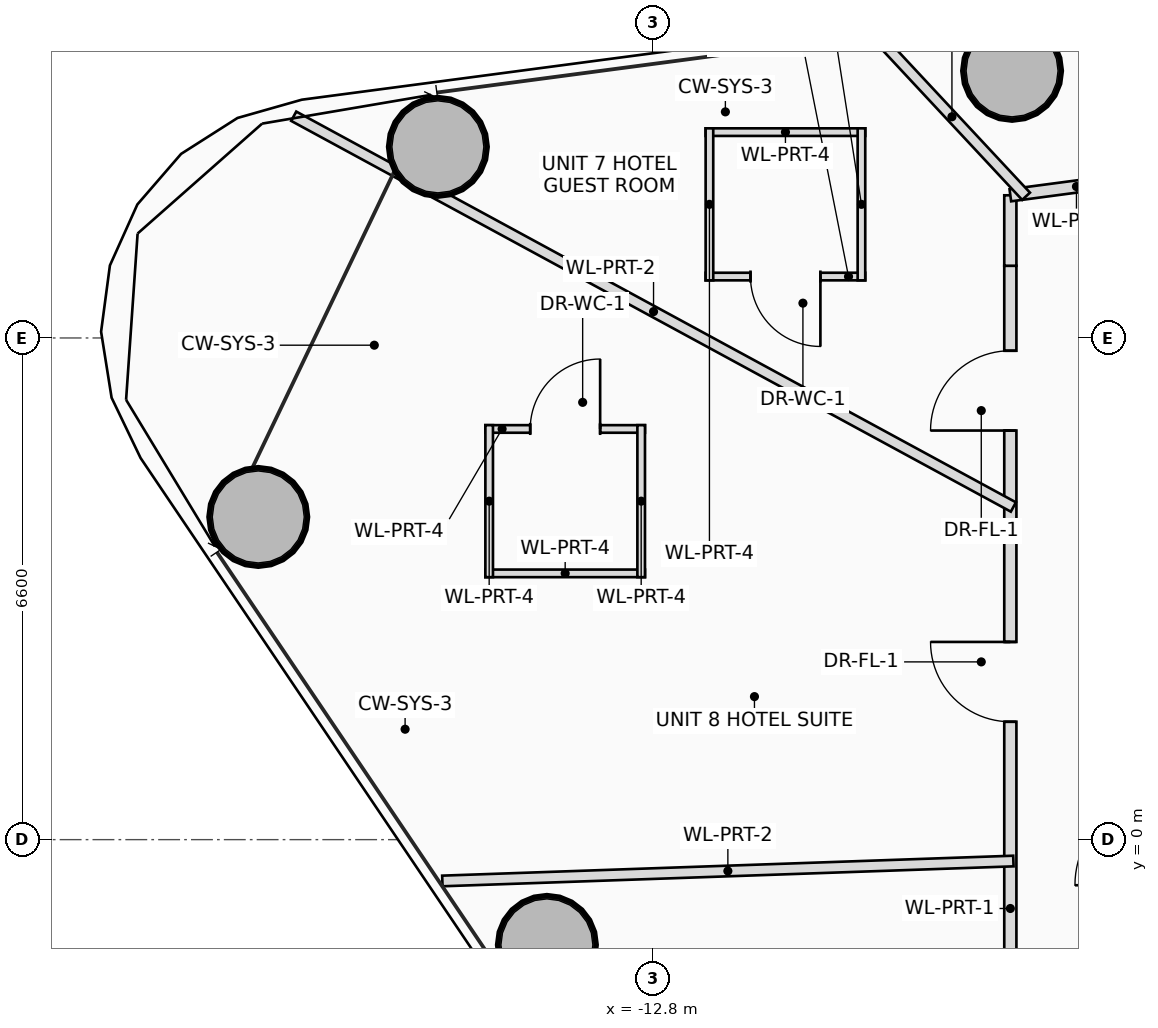
"""IFC4 building model, lengths in metres.
Left out: names, types, materials, properties, quantities, classifications, styles, units other than length and angle.
Written with IfcOpenShell. Run it as: python <this file> out.ifc"""

import sys

from ifc_helpers import new_model, si_unit, direction, frame, frame_2d, origin, origin_2d, place, context, subcontext, project, spatial, rectangle, hollow_circle, extrude, source, transform, mapped, element, fill, save


model = new_model("IFC4")
c1 = context("Model", 3, precision=1e-05, world=origin(), true_north=direction((0.0, 1.0)))
c2 = subcontext(c1, "Body", "Model", "MODEL_VIEW")
j1 = project(units=[si_unit("LENGTHUNIT", "METRE"), si_unit("PLANEANGLEUNIT", "RADIAN")], contexts=[c1])
p1 = place(None, origin())
s1 = spatial("IfcSite", under=j1, at=p1, CompositionType="ELEMENT")
p2 = place(p1, origin())
s2 = spatial("IfcBuilding", under=s1, at=p2, CompositionType="ELEMENT")
p3 = place(p2, frame((0.0, 0.0, 169.1)))
s3 = spatial("IfcBuildingStorey", under=s2, at=p3, CompositionType="ELEMENT", Elevation=169.1)
m1 = source(origin(), c2, "Body", "SweptSolid", [
    extrude(hollow_circle(Radius=0.65, WallThickness=0.045, at=origin_2d()), origin(), (0.0, 0.0, 1.0), 3.45),
])
for number, where, z_axis, x_axis in (
    (1, (-8.077, 10.114, 0.0), (0.0, 0.0, 1.0), (1.0, 0.0, 0.0)),
    (2, (-15.632, 9.114, 0.0), (0.0, 0.0, 1.0), (1.0, 0.0, 0.0)),
    (3, (-17.995, 4.245, 0.0), (0.0, 0.0, 1.0), (1.0, 0.0, 0.0)),
    (4, (-14.198, -1.385, 0.0), (0.0, 0.0, 1.0), (1.0, 0.0, 0.0)),
):
    element("IfcColumn", number, at=place(p3, frame(where, z_axis=z_axis, x_axis=x_axis)), inside=s3, PredefinedType="COLUMN", context=c2, shape_type="MappedRepresentation", body=[
        mapped(m1, transform((0.0, 0.0, 0.0), scale=1.0)),
    ])
p4 = place(p3, frame((-12.109, 9.308, 0.0), z_axis=(0.0, 0.0, 1.0), x_axis=(1.0, 0.0, 0.0)))
e5 = element("IfcWall", 5, at=p4, inside=s3, PredefinedType="PARTITIONING", context=c2, shape_type="SweptSolid", body=[
    extrude(rectangle(XDim=2.1, YDim=0.1, at=frame_2d((1.05, 0.0))), origin(), (0.0, 0.0, 1.0), 3.25),
])
p5 = place(p3, frame((-10.009, 7.408, 0.0), z_axis=(0.0, 0.0, 1.0), x_axis=(-1.0, 0.0, 0.0)))
e6 = element("IfcWall", 6, at=p5, inside=s3, PredefinedType="PARTITIONING", context=c2, shape_type="SweptSolid", body=[
    extrude(rectangle(XDim=2.1, YDim=0.1, at=frame_2d((1.05, 0.0))), origin(), (0.0, 0.0, 1.0), 2.605),
])
p6 = place(p5, frame((0.59, 0.0, 0.0)))
e7 = element("IfcOpeningElement", 7, at=p6, cuts=e6, PredefinedType="OPENING", context=c2, shape_type="SweptSolid", body=[
    extrude(rectangle(XDim=0.92, YDim=2.1, at=frame_2d((0.46, 1.05))), frame((0.0, 0.06, 0.0), z_axis=(0.0, -1.0, 0.0), x_axis=(1.0, 0.0, 0.0)), (0.0, 0.0, 1.0), 0.12),
])
p7 = place(p3, frame((-10.059, 9.358, 0.0), z_axis=(0.0, 0.0, 1.0), x_axis=(0.0, -1.0, 0.0)))
e8 = element("IfcWall", 8, at=p7, inside=s3, PredefinedType="PARTITIONING", context=c2, shape_type="SweptSolid", body=[
    extrude(rectangle(XDim=2.0, YDim=0.1, at=frame_2d((1.0, 0.0))), origin(), (0.0, 0.0, 1.0), 2.805),
])
p8 = place(p3, frame((-12.059, 7.358, 0.0), z_axis=(0.0, 0.0, 1.0), x_axis=(0.0, 1.0, 0.0)))
e9 = element("IfcWall", 9, at=p8, inside=s3, PredefinedType="PARTITIONING", context=c2, shape_type="SweptSolid", body=[
    extrude(rectangle(XDim=2.0, YDim=0.1, at=frame_2d((1.0, 0.0))), origin(), (0.0, 0.0, 1.0), 2.605),
])
p9 = place(p3, frame((-15.007, 5.403, 0.0), z_axis=(0.0, 0.0, 1.0), x_axis=(1.0, 0.0, 0.0)))
e10 = element("IfcWall", 10, at=p9, inside=s3, PredefinedType="PARTITIONING", context=c2, shape_type="SweptSolid", body=[
    extrude(rectangle(XDim=2.1, YDim=0.1, at=frame_2d((1.05, 0.0))), origin(), (0.0, 0.0, 1.0), 2.905),
])
p10 = place(p9, frame((0.59, 0.0, 0.0)))
e11 = element("IfcOpeningElement", 11, at=p10, cuts=e10, PredefinedType="OPENING", context=c2, shape_type="SweptSolid", body=[
    extrude(rectangle(XDim=0.92, YDim=2.1, at=frame_2d((0.46, 1.05))), frame((0.0, 0.06, 0.0), z_axis=(0.0, -1.0, 0.0), x_axis=(1.0, 0.0, 0.0)), (0.0, 0.0, 1.0), 0.12),
])
p11 = place(p3, frame((-12.907, 3.503, 0.0), z_axis=(0.0, 0.0, 1.0), x_axis=(-1.0, 0.0, 0.0)))
e12 = element("IfcWall", 12, at=p11, inside=s3, PredefinedType="PARTITIONING", context=c2, shape_type="SweptSolid", body=[
    extrude(rectangle(XDim=2.1, YDim=0.1, at=frame_2d((1.05, 0.0))), origin(), (0.0, 0.0, 1.0), 2.905),
])
for number, where, z_axis, x_axis in (
    (13, (-12.957, 5.453, 0.0), (0.0, 0.0, 1.0), (0.0, -1.0, 0.0)),
    (14, (-14.957, 3.453, 0.0), (0.0, 0.0, 1.0), (0.0, 1.0, 0.0)),
):
    element("IfcWall", number, at=place(p3, frame(where, z_axis=z_axis, x_axis=x_axis)), inside=s3, PredefinedType="PARTITIONING", context=c2, shape_type="SweptSolid", body=[
        extrude(rectangle(XDim=2.0, YDim=0.1, at=frame_2d((1.0, 0.0))), origin(), (0.0, 0.0, 1.0), 2.605),
    ])
p12 = place(p3, frame((-8.1, -7.528, 0.0), z_axis=(0.0, 0.0, 1.0), x_axis=(0.0, 1.0, 0.0)))
e15 = element("IfcWall", 15, at=p12, inside=s3, PredefinedType="PARTITIONING", context=c2, shape_type="SweptSolid", body=[
    extrude(rectangle(XDim=15.078, YDim=0.16, at=frame_2d((7.539, 0.0))), origin(), (0.0, 0.0, 1.0), 2.605),
])
p13 = place(p12, frame((3.265, 0.0, 0.0)))
e16 = element("IfcOpeningElement", 16, at=p13, cuts=e15, PredefinedType="OPENING", context=c2, shape_type="SweptSolid", body=[
    extrude(rectangle(XDim=0.9, YDim=2.05, at=frame_2d((0.45, 1.025))), frame((0.0, 0.09, 0.0), z_axis=(0.0, -1.0, 0.0), x_axis=(1.0, 0.0, 0.0)), (0.0, 0.0, 1.0), 0.18),
])
p14 = place(p12, frame((9.079, 0.0, 0.0)))
e17 = element("IfcOpeningElement", 17, at=p14, cuts=e15, PredefinedType="OPENING", context=c2, shape_type="SweptSolid", body=[
    extrude(rectangle(XDim=1.05, YDim=2.2, at=frame_2d((0.525, 1.1))), frame((0.0, 0.09, 0.0), z_axis=(0.0, -1.0, 0.0), x_axis=(1.0, 0.0, 0.0)), (0.0, 0.0, 1.0), 0.18),
])
p15 = place(p12, frame((12.91, 0.0, 0.0)))
e18 = element("IfcOpeningElement", 18, at=p15, cuts=e15, PredefinedType="OPENING", context=c2, shape_type="SweptSolid", body=[
    extrude(rectangle(XDim=1.05, YDim=2.2, at=frame_2d((0.525, 1.1))), frame((0.0, 0.09, 0.0), z_axis=(0.0, -1.0, 0.0), x_axis=(1.0, 0.0, 0.0)), (0.0, 0.0, 1.0), 0.18),
])
p16 = place(p3, frame((-8.1, 7.55, 0.0), z_axis=(0.0, 0.0, 1.0), x_axis=(0.0, 1.0, 0.0)))
e19 = element("IfcWall", 19, at=p16, inside=s3, PredefinedType="PARTITIONING", context=c2, shape_type="SweptSolid", body=[
    extrude(rectangle(XDim=0.927, YDim=0.16, at=frame_2d((0.463, 0.0))), origin(), (0.0, 0.0, 1.0), 2.805),
])
p17 = place(p3, frame((-8.1, 8.477, 0.0), z_axis=(0.0, 0.0, 1.0), x_axis=(0.991341723558, 0.131307224223, 0.0)))
e20 = element("IfcWall", 20, at=p17, inside=s3, PredefinedType="PARTITIONING", context=c2, shape_type="SweptSolid", body=[
    extrude(rectangle(XDim=1.755, YDim=0.16, at=frame_2d((0.877, 0.0))), origin(), (0.0, 0.0, 1.0), 2.605),
])
p18 = place(p3, frame((-7.893, 8.464, 0.0), z_axis=(0.0, 0.0, 1.0), x_axis=(-0.682011061147, 0.73134185746, 0.0)))
e21 = element("IfcWall", 21, at=p18, inside=s3, PredefinedType="PARTITIONING", context=c2, shape_type="SweptSolid", body=[
    extrude(rectangle(XDim=2.861, YDim=0.14, at=frame_2d((1.43, 0.0))), origin(), (0.0, 0.0, 1.0), 2.765),
])
p19 = place(p3, frame((-8.06, 4.376, 0.0), z_axis=(0.0, 0.0, 1.0), x_axis=(-0.878817054271, 0.477158867802, 0.0)))
e22 = element("IfcWall", 22, at=p19, inside=s3, PredefinedType="PARTITIONING", context=c2, shape_type="SweptSolid", body=[
    extrude(rectangle(XDim=10.774, YDim=0.14, at=frame_2d((5.387, 0.0))), origin(), (0.0, 0.0, 1.0), 2.605),
])
p20 = place(p3, frame((-8.06, -0.281, 0.0), z_axis=(0.0, 0.0, 1.0), x_axis=(-0.999391525522, -0.034879488461, 0.0)))
e23 = element("IfcWall", 23, at=p20, inside=s3, PredefinedType="PARTITIONING", context=c2, shape_type="SweptSolid", body=[
    extrude(rectangle(XDim=7.518, YDim=0.14, at=frame_2d((3.759, 0.0))), origin(), (0.0, 0.0, 1.0), 2.765),
])
p21 = place(p6, origin())
e24 = element("IfcDoor", 24, at=p21, inside=s3, OperationType="SINGLE_SWING_LEFT", PredefinedType="DOOR", context=c2, shape_type="SweptSolid", body=[
    extrude(rectangle(XDim=0.92, YDim=2.1, at=frame_2d((0.46, 1.05))), frame((0.0, 0.025, 0.0), z_axis=(0.0, -1.0, 0.0), x_axis=(1.0, 0.0, 0.0)), (0.0, 0.0, 1.0), 0.05),
])
fill(e7, e24)
p22 = place(p10, origin())
e25 = element("IfcDoor", 25, at=p22, inside=s3, OperationType="SINGLE_SWING_RIGHT", PredefinedType="DOOR", context=c2, shape_type="SweptSolid", body=[
    extrude(rectangle(XDim=0.92, YDim=2.1, at=frame_2d((0.46, 1.05))), frame((0.0, 0.025, 0.0), z_axis=(0.0, -1.0, 0.0), x_axis=(1.0, 0.0, 0.0)), (0.0, 0.0, 1.0), 0.05),
])
fill(e11, e25)
p23 = place(p14, origin())
e26 = element("IfcDoor", 26, at=p23, inside=s3, OperationType="SINGLE_SWING_RIGHT", PredefinedType="DOOR", context=c2, shape_type="SweptSolid", body=[
    extrude(rectangle(XDim=1.05, YDim=2.2, at=frame_2d((0.525, 1.1))), frame((0.0, 0.025, 0.0), z_axis=(0.0, -1.0, 0.0), x_axis=(1.0, 0.0, 0.0)), (0.0, 0.0, 1.0), 0.05),
])
fill(e17, e26)
p24 = place(p15, origin())
e27 = element("IfcDoor", 27, at=p24, inside=s3, OperationType="SINGLE_SWING_LEFT", PredefinedType="DOOR", context=c2, shape_type="SweptSolid", body=[
    extrude(rectangle(XDim=1.05, YDim=2.2, at=frame_2d((0.525, 1.1))), frame((0.0, 0.025, 0.0), z_axis=(0.0, -1.0, 0.0), x_axis=(1.0, 0.0, 0.0)), (0.0, 0.0, 1.0), 0.05),
])
fill(e18, e27)
save(model, sys.argv[1])
